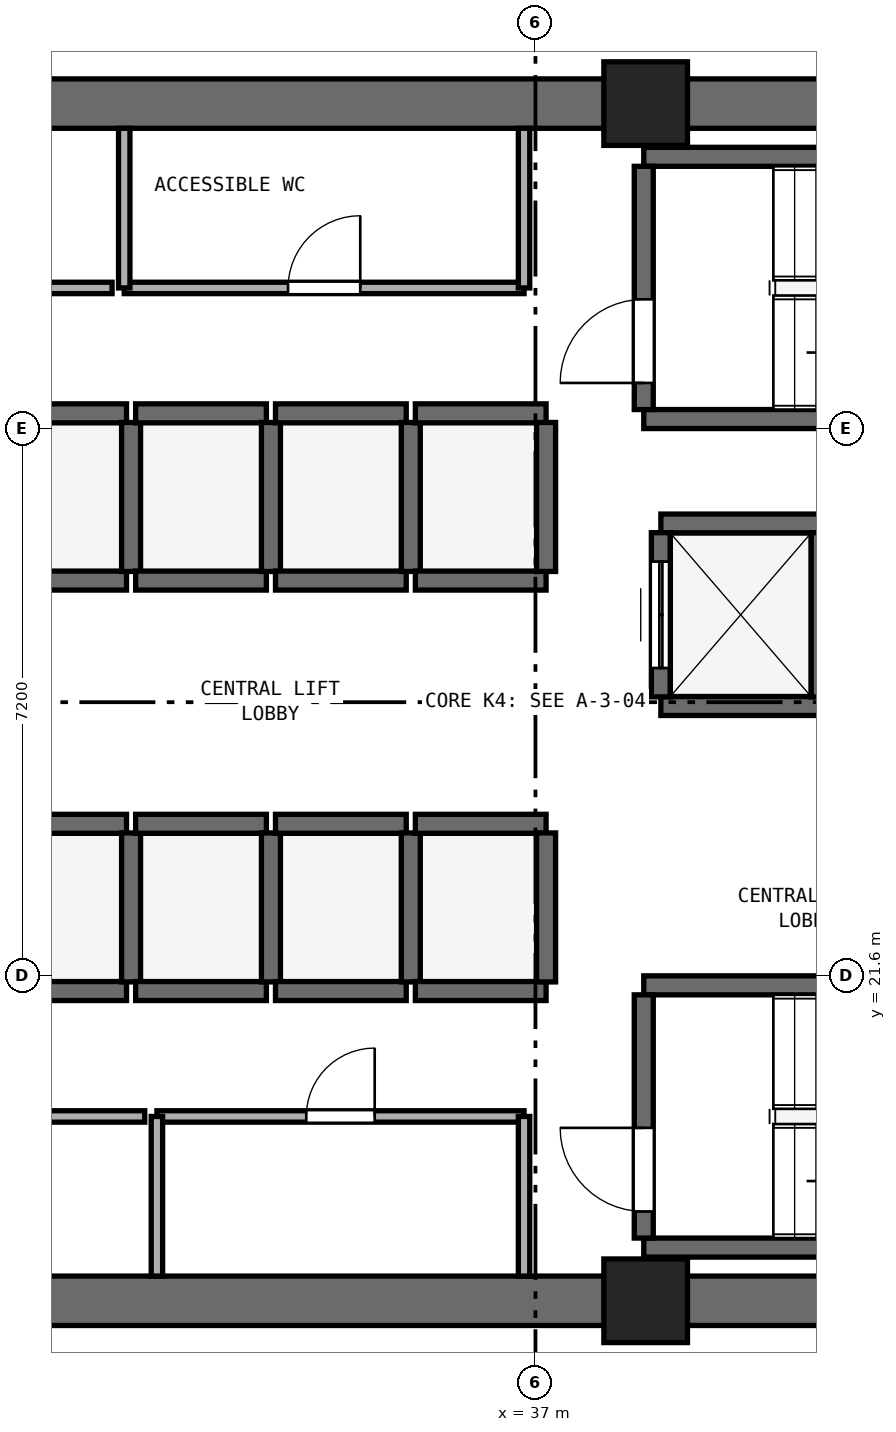
"""IFC4 building model, lengths in metres.
Left out: names, types, materials, properties, quantities, classifications, styles, units other than length and angle.
Written with IfcOpenShell. Run it as: python <this file> out.ifc"""

import sys

from ifc_helpers import new_model, si_unit, direction, frame, frame_2d, origin, origin_2d, place, context, subcontext, project, spatial, rectangle, extrude, element, fill, save


model = new_model("IFC4")
c1 = context("Model", 3, precision=1e-05, world=origin(), true_north=direction((0.0, 1.0)))
c2 = subcontext(c1, "Body", "Model", "MODEL_VIEW")
j1 = project(units=[si_unit("LENGTHUNIT", "METRE"), si_unit("PLANEANGLEUNIT", "RADIAN")], contexts=[c1])
p1 = place(None, origin())
s1 = spatial("IfcSite", under=j1, at=p1, CompositionType="ELEMENT")
p2 = place(p1, origin())
s2 = spatial("IfcBuilding", under=s1, at=p2, CompositionType="ELEMENT")
p3 = place(p2, frame((0.0, 0.0, 120.0)))
s3 = spatial("IfcBuildingStorey", under=s2, at=p3, CompositionType="ELEMENT", Elevation=120.0)
for number, where, z_axis, x_axis in (
    (1, (25.4, 17.325, 0.0), (0.0, 0.0, 1.0), (1.0, 0.0, 0.0)),
    (2, (25.4, 33.075, 0.0), (0.0, 0.0, 1.0), (1.0, 0.0, 0.0)),
):
    element("IfcWall", number, at=place(p3, frame(where, z_axis=z_axis, x_axis=x_axis)), inside=s3, PredefinedType="SHEAR", context=c2, shape_type="SweptSolid", body=[
        extrude(rectangle(XDim=23.2, YDim=0.65, at=frame_2d((11.6, 0.0))), origin(), (0.0, 0.0, 1.0), 4.6),
    ])
for number, where, z_axis, x_axis in (
    (3, (38.45, 17.325, 0.0), (0.0, 0.0, 1.0), (1.0, 0.0, 0.0)),
    (4, (38.45, 33.075, 0.0), (0.0, 0.0, 1.0), (1.0, 0.0, 0.0)),
):
    element("IfcColumn", number, at=place(p3, frame(where, z_axis=z_axis, x_axis=x_axis)), inside=s3, PredefinedType="PILASTER", context=c2, shape_type="SweptSolid", body=[
        extrude(rectangle(XDim=1.1, YDim=1.1, at=origin_2d()), origin(), (0.0, 0.0, 1.0), 5.0),
    ])
for number, where, z_axis, x_axis in (
    (5, (38.425, 28.925, 0.0), (0.0, 0.0, 1.0), (1.0, 0.0, 0.0)),
    (6, (38.425, 32.375, 0.0), (0.0, 0.0, 1.0), (1.0, 0.0, 0.0)),
):
    element("IfcWall", number, at=place(p3, frame(where, z_axis=z_axis, x_axis=x_axis)), inside=s3, PredefinedType="SHEAR", context=c2, shape_type="SweptSolid", body=[
        extrude(rectangle(XDim=7.3, YDim=0.25, at=frame_2d((3.65, 0.0))), origin(), (0.0, 0.0, 1.0), 4.6),
    ])
p4 = place(p3, frame((38.425, 29.05, 0.0), z_axis=(0.0, 0.0, 1.0), x_axis=(0.0, 1.0, 0.0)))
e7 = element("IfcWall", 7, at=p4, inside=s3, PredefinedType="SHEAR", context=c2, shape_type="SweptSolid", body=[
    extrude(rectangle(XDim=3.2, YDim=0.25, at=frame_2d((1.6, 0.0))), origin(), (0.0, 0.0, 1.0), 4.6),
])
p5 = place(p4, frame((0.35, 0.0, 0.0)))
e8 = element("IfcOpeningElement", 8, at=p5, cuts=e7, PredefinedType="OPENING", context=c2, shape_type="SweptSolid", body=[
    extrude(rectangle(XDim=1.1, YDim=2.15, at=frame_2d((0.55, 1.075))), frame((0.0, 0.135, 0.0), z_axis=(0.0, -1.0, 0.0), x_axis=(1.0, 0.0, 0.0)), (0.0, 0.0, 1.0), 0.27),
])
for number, where, z_axis, x_axis in (
    (9, (38.425, 18.025, 0.0), (0.0, 0.0, 1.0), (1.0, 0.0, 0.0)),
    (10, (38.425, 21.475, 0.0), (0.0, 0.0, 1.0), (1.0, 0.0, 0.0)),
):
    element("IfcWall", number, at=place(p3, frame(where, z_axis=z_axis, x_axis=x_axis)), inside=s3, PredefinedType="SHEAR", context=c2, shape_type="SweptSolid", body=[
        extrude(rectangle(XDim=7.3, YDim=0.25, at=frame_2d((3.65, 0.0))), origin(), (0.0, 0.0, 1.0), 4.6),
    ])
p6 = place(p3, frame((38.425, 18.15, 0.0), z_axis=(0.0, 0.0, 1.0), x_axis=(0.0, 1.0, 0.0)))
e11 = element("IfcWall", 11, at=p6, inside=s3, PredefinedType="SHEAR", context=c2, shape_type="SweptSolid", body=[
    extrude(rectangle(XDim=3.2, YDim=0.25, at=frame_2d((1.6, 0.0))), origin(), (0.0, 0.0, 1.0), 4.6),
])
p7 = place(p6, frame((0.35, 0.0, 0.0)))
e12 = element("IfcOpeningElement", 12, at=p7, cuts=e11, PredefinedType="OPENING", context=c2, shape_type="SweptSolid", body=[
    extrude(rectangle(XDim=1.1, YDim=2.15, at=frame_2d((0.55, 1.075))), frame((0.0, 0.135, 0.0), z_axis=(0.0, -1.0, 0.0), x_axis=(1.0, 0.0, 0.0)), (0.0, 0.0, 1.0), 0.27),
])
for number, where, z_axis, x_axis in (
    (13, (29.9, 21.4, 0.0), (0.0, 0.0, 1.0), (1.0, 0.0, 0.0)),
    (14, (29.9, 23.6, 0.0), (0.0, 0.0, 1.0), (1.0, 0.0, 0.0)),
):
    element("IfcWall", number, at=place(p3, frame(where, z_axis=z_axis, x_axis=x_axis)), inside=s3, PredefinedType="SHEAR", context=c2, shape_type="SweptSolid", body=[
        extrude(rectangle(XDim=1.72, YDim=0.25, at=frame_2d((0.86, 0.0))), origin(), (0.0, 0.0, 1.0), 4.6),
    ])
p8 = place(p3, frame((31.68, 21.52, 0.0), z_axis=(0.0, 0.0, 1.0), x_axis=(0.0, 1.0, 0.0)))
e15 = element("IfcWall", 15, at=p8, inside=s3, PredefinedType="SHEAR", context=c2, shape_type="SweptSolid", body=[
    extrude(rectangle(XDim=1.96, YDim=0.25, at=frame_2d((0.98, 0.0))), origin(), (0.0, 0.0, 1.0), 4.6),
])
for number, where, z_axis, x_axis in (
    (16, (31.74, 21.4, 0.0), (0.0, 0.0, 1.0), (1.0, 0.0, 0.0)),
    (17, (31.74, 23.6, 0.0), (0.0, 0.0, 1.0), (1.0, 0.0, 0.0)),
):
    element("IfcWall", number, at=place(p3, frame(where, z_axis=z_axis, x_axis=x_axis)), inside=s3, PredefinedType="SHEAR", context=c2, shape_type="SweptSolid", body=[
        extrude(rectangle(XDim=1.72, YDim=0.25, at=frame_2d((0.86, 0.0))), origin(), (0.0, 0.0, 1.0), 4.6),
    ])
p9 = place(p3, frame((33.52, 21.52, 0.0), z_axis=(0.0, 0.0, 1.0), x_axis=(0.0, 1.0, 0.0)))
e18 = element("IfcWall", 18, at=p9, inside=s3, PredefinedType="SHEAR", context=c2, shape_type="SweptSolid", body=[
    extrude(rectangle(XDim=1.96, YDim=0.25, at=frame_2d((0.98, 0.0))), origin(), (0.0, 0.0, 1.0), 4.6),
])
for number, where, z_axis, x_axis in (
    (19, (33.58, 21.4, 0.0), (0.0, 0.0, 1.0), (1.0, 0.0, 0.0)),
    (20, (33.58, 23.6, 0.0), (0.0, 0.0, 1.0), (1.0, 0.0, 0.0)),
):
    element("IfcWall", number, at=place(p3, frame(where, z_axis=z_axis, x_axis=x_axis)), inside=s3, PredefinedType="SHEAR", context=c2, shape_type="SweptSolid", body=[
        extrude(rectangle(XDim=1.72, YDim=0.25, at=frame_2d((0.86, 0.0))), origin(), (0.0, 0.0, 1.0), 4.6),
    ])
p10 = place(p3, frame((35.36, 21.52, 0.0), z_axis=(0.0, 0.0, 1.0), x_axis=(0.0, 1.0, 0.0)))
e21 = element("IfcWall", 21, at=p10, inside=s3, PredefinedType="SHEAR", context=c2, shape_type="SweptSolid", body=[
    extrude(rectangle(XDim=1.96, YDim=0.25, at=frame_2d((0.98, 0.0))), origin(), (0.0, 0.0, 1.0), 4.6),
])
for number, where, z_axis, x_axis in (
    (22, (35.42, 21.4, 0.0), (0.0, 0.0, 1.0), (1.0, 0.0, 0.0)),
    (23, (35.42, 23.6, 0.0), (0.0, 0.0, 1.0), (1.0, 0.0, 0.0)),
):
    element("IfcWall", number, at=place(p3, frame(where, z_axis=z_axis, x_axis=x_axis)), inside=s3, PredefinedType="SHEAR", context=c2, shape_type="SweptSolid", body=[
        extrude(rectangle(XDim=1.72, YDim=0.25, at=frame_2d((0.86, 0.0))), origin(), (0.0, 0.0, 1.0), 4.6),
    ])
p11 = place(p3, frame((37.14, 21.52, 0.0), z_axis=(0.0, 0.0, 1.0), x_axis=(0.0, 1.0, 0.0)))
e24 = element("IfcWall", 24, at=p11, inside=s3, PredefinedType="SHEAR", context=c2, shape_type="SweptSolid", body=[
    extrude(rectangle(XDim=1.96, YDim=0.25, at=frame_2d((0.98, 0.0))), origin(), (0.0, 0.0, 1.0), 4.6),
])
for number, where, z_axis, x_axis in (
    (25, (29.9, 26.8, 0.0), (0.0, 0.0, 1.0), (1.0, 0.0, 0.0)),
    (26, (29.9, 29.0, 0.0), (0.0, 0.0, 1.0), (1.0, 0.0, 0.0)),
):
    element("IfcWall", number, at=place(p3, frame(where, z_axis=z_axis, x_axis=x_axis)), inside=s3, PredefinedType="SHEAR", context=c2, shape_type="SweptSolid", body=[
        extrude(rectangle(XDim=1.72, YDim=0.25, at=frame_2d((0.86, 0.0))), origin(), (0.0, 0.0, 1.0), 4.6),
    ])
p12 = place(p3, frame((31.68, 26.92, 0.0), z_axis=(0.0, 0.0, 1.0), x_axis=(0.0, 1.0, 0.0)))
e27 = element("IfcWall", 27, at=p12, inside=s3, PredefinedType="SHEAR", context=c2, shape_type="SweptSolid", body=[
    extrude(rectangle(XDim=1.96, YDim=0.25, at=frame_2d((0.98, 0.0))), origin(), (0.0, 0.0, 1.0), 4.6),
])
for number, where, z_axis, x_axis in (
    (28, (31.74, 26.8, 0.0), (0.0, 0.0, 1.0), (1.0, 0.0, 0.0)),
    (29, (31.74, 29.0, 0.0), (0.0, 0.0, 1.0), (1.0, 0.0, 0.0)),
):
    element("IfcWall", number, at=place(p3, frame(where, z_axis=z_axis, x_axis=x_axis)), inside=s3, PredefinedType="SHEAR", context=c2, shape_type="SweptSolid", body=[
        extrude(rectangle(XDim=1.72, YDim=0.25, at=frame_2d((0.86, 0.0))), origin(), (0.0, 0.0, 1.0), 4.6),
    ])
p13 = place(p3, frame((33.52, 26.92, 0.0), z_axis=(0.0, 0.0, 1.0), x_axis=(0.0, 1.0, 0.0)))
e30 = element("IfcWall", 30, at=p13, inside=s3, PredefinedType="SHEAR", context=c2, shape_type="SweptSolid", body=[
    extrude(rectangle(XDim=1.96, YDim=0.25, at=frame_2d((0.98, 0.0))), origin(), (0.0, 0.0, 1.0), 4.6),
])
for number, where, z_axis, x_axis in (
    (31, (33.58, 26.8, 0.0), (0.0, 0.0, 1.0), (1.0, 0.0, 0.0)),
    (32, (33.58, 29.0, 0.0), (0.0, 0.0, 1.0), (1.0, 0.0, 0.0)),
):
    element("IfcWall", number, at=place(p3, frame(where, z_axis=z_axis, x_axis=x_axis)), inside=s3, PredefinedType="SHEAR", context=c2, shape_type="SweptSolid", body=[
        extrude(rectangle(XDim=1.72, YDim=0.25, at=frame_2d((0.86, 0.0))), origin(), (0.0, 0.0, 1.0), 4.6),
    ])
p14 = place(p3, frame((35.36, 26.92, 0.0), z_axis=(0.0, 0.0, 1.0), x_axis=(0.0, 1.0, 0.0)))
e33 = element("IfcWall", 33, at=p14, inside=s3, PredefinedType="SHEAR", context=c2, shape_type="SweptSolid", body=[
    extrude(rectangle(XDim=1.96, YDim=0.25, at=frame_2d((0.98, 0.0))), origin(), (0.0, 0.0, 1.0), 4.6),
])
for number, where, z_axis, x_axis in (
    (34, (35.42, 26.8, 0.0), (0.0, 0.0, 1.0), (1.0, 0.0, 0.0)),
    (35, (35.42, 29.0, 0.0), (0.0, 0.0, 1.0), (1.0, 0.0, 0.0)),
):
    element("IfcWall", number, at=place(p3, frame(where, z_axis=z_axis, x_axis=x_axis)), inside=s3, PredefinedType="SHEAR", context=c2, shape_type="SweptSolid", body=[
        extrude(rectangle(XDim=1.72, YDim=0.25, at=frame_2d((0.86, 0.0))), origin(), (0.0, 0.0, 1.0), 4.6),
    ])
p15 = place(p3, frame((37.14, 26.92, 0.0), z_axis=(0.0, 0.0, 1.0), x_axis=(0.0, 1.0, 0.0)))
e36 = element("IfcWall", 36, at=p15, inside=s3, PredefinedType="SHEAR", context=c2, shape_type="SweptSolid", body=[
    extrude(rectangle(XDim=1.96, YDim=0.25, at=frame_2d((0.98, 0.0))), origin(), (0.0, 0.0, 1.0), 4.6),
])
for number, where, z_axis, x_axis in (
    (37, (38.65, 25.15, 0.0), (0.0, 0.0, 1.0), (1.0, 0.0, 0.0)),
    (38, (38.65, 27.55, 0.0), (0.0, 0.0, 1.0), (1.0, 0.0, 0.0)),
):
    element("IfcWall", number, at=place(p3, frame(where, z_axis=z_axis, x_axis=x_axis)), inside=s3, PredefinedType="SHEAR", context=c2, shape_type="SweptSolid", body=[
        extrude(rectangle(XDim=2.1, YDim=0.25, at=frame_2d((1.05, 0.0))), origin(), (0.0, 0.0, 1.0), 4.6),
    ])
p16 = place(p3, frame((38.65, 25.27, 0.0), z_axis=(0.0, 0.0, 1.0), x_axis=(0.0, 1.0, 0.0)))
e39 = element("IfcWall", 39, at=p16, inside=s3, PredefinedType="SHEAR", context=c2, shape_type="SweptSolid", body=[
    extrude(rectangle(XDim=2.16, YDim=0.25, at=frame_2d((1.08, 0.0))), origin(), (0.0, 0.0, 1.0), 4.6),
])
p17 = place(p16, frame((0.38, 0.0, 0.0)))
e40 = element("IfcOpeningElement", 40, at=p17, cuts=e39, PredefinedType="OPENING", context=c2, shape_type="SweptSolid", body=[
    extrude(rectangle(XDim=1.4, YDim=2.2, at=frame_2d((0.7, 1.1))), frame((0.0, 0.135, 0.0), z_axis=(0.0, -1.0, 0.0), x_axis=(1.0, 0.0, 0.0)), (0.0, 0.0, 1.0), 0.27),
])
p18 = place(p3, frame((40.75, 25.27, 0.0), z_axis=(0.0, 0.0, 1.0), x_axis=(0.0, 1.0, 0.0)))
e41 = element("IfcWall", 41, at=p18, inside=s3, PredefinedType="SHEAR", context=c2, shape_type="SweptSolid", body=[
    extrude(rectangle(XDim=2.16, YDim=0.25, at=frame_2d((1.08, 0.0))), origin(), (0.0, 0.0, 1.0), 4.6),
])
p19 = place(p3, frame((26.17, 30.65, 0.0), z_axis=(0.0, 0.0, 1.0), x_axis=(1.0, 0.0, 0.0)))
e42 = element("IfcWall", 42, at=p19, inside=s3, PredefinedType="PARTITIONING", context=c2, shape_type="SweptSolid", body=[
    extrude(rectangle(XDim=5.26, YDim=0.15, at=frame_2d((2.63, 0.0))), origin(), (0.0, 0.0, 1.0), 4.6),
])
p20 = place(p19, frame((2.155, 0.0, 0.0)))
e43 = element("IfcOpeningElement", 43, at=p20, cuts=e42, PredefinedType="OPENING", context=c2, shape_type="SweptSolid", body=[
    extrude(rectangle(XDim=0.95, YDim=2.1, at=frame_2d((0.475, 1.05))), frame((0.0, 0.085, 0.0), z_axis=(0.0, -1.0, 0.0), x_axis=(1.0, 0.0, 0.0)), (0.0, 0.0, 1.0), 0.17),
])
p21 = place(p3, frame((31.59, 30.65, 0.0), z_axis=(0.0, 0.0, 1.0), x_axis=(1.0, 0.0, 0.0)))
e44 = element("IfcWall", 44, at=p21, inside=s3, PredefinedType="PARTITIONING", context=c2, shape_type="SweptSolid", body=[
    extrude(rectangle(XDim=5.26, YDim=0.15, at=frame_2d((2.63, 0.0))), origin(), (0.0, 0.0, 1.0), 4.6),
])
p22 = place(p21, frame((2.155, 0.0, 0.0)))
e45 = element("IfcOpeningElement", 45, at=p22, cuts=e44, PredefinedType="OPENING", context=c2, shape_type="SweptSolid", body=[
    extrude(rectangle(XDim=0.95, YDim=2.1, at=frame_2d((0.475, 1.05))), frame((0.0, 0.085, 0.0), z_axis=(0.0, -1.0, 0.0), x_axis=(1.0, 0.0, 0.0)), (0.0, 0.0, 1.0), 0.17),
])
for number, where, z_axis, x_axis in (
    (46, (31.59, 30.65, 0.0), (0.0, 0.0, 1.0), (0.0, 1.0, 0.0)),
    (47, (36.85, 30.65, 0.0), (0.0, 0.0, 1.0), (0.0, 1.0, 0.0)),
):
    element("IfcWall", number, at=place(p3, frame(where, z_axis=z_axis, x_axis=x_axis)), inside=s3, PredefinedType="PARTITIONING", context=c2, shape_type="SweptSolid", body=[
        extrude(rectangle(XDim=2.1, YDim=0.15, at=frame_2d((1.05, 0.0))), origin(), (0.0, 0.0, 1.0), 4.6),
    ])
p23 = place(p3, frame((26.17, 19.75, 0.0), z_axis=(0.0, 0.0, 1.0), x_axis=(1.0, 0.0, 0.0)))
e48 = element("IfcWall", 48, at=p23, inside=s3, PredefinedType="PARTITIONING", context=c2, shape_type="SweptSolid", body=[
    extrude(rectangle(XDim=5.69, YDim=0.15, at=frame_2d((2.845, 0.0))), origin(), (0.0, 0.0, 1.0), 4.6),
])
p24 = place(p23, frame((2.37, 0.0, 0.0)))
e49 = element("IfcOpeningElement", 49, at=p24, cuts=e48, PredefinedType="OPENING", context=c2, shape_type="SweptSolid", body=[
    extrude(rectangle(XDim=0.95, YDim=2.1, at=frame_2d((0.475, 1.05))), frame((0.0, 0.085, 0.0), z_axis=(0.0, -1.0, 0.0), x_axis=(1.0, 0.0, 0.0)), (0.0, 0.0, 1.0), 0.17),
])
p25 = place(p3, frame((32.02, 19.75, 0.0), z_axis=(0.0, 0.0, 1.0), x_axis=(1.0, 0.0, 0.0)))
e50 = element("IfcWall", 50, at=p25, inside=s3, PredefinedType="PARTITIONING", context=c2, shape_type="SweptSolid", body=[
    extrude(rectangle(XDim=4.83, YDim=0.15, at=frame_2d((2.415, 0.0))), origin(), (0.0, 0.0, 1.0), 4.6),
])
p26 = place(p25, frame((1.965, 0.0, 0.0)))
e51 = element("IfcOpeningElement", 51, at=p26, cuts=e50, PredefinedType="OPENING", context=c2, shape_type="SweptSolid", body=[
    extrude(rectangle(XDim=0.9, YDim=2.1, at=frame_2d((0.45, 1.05))), frame((0.0, 0.085, 0.0), z_axis=(0.0, -1.0, 0.0), x_axis=(1.0, 0.0, 0.0)), (0.0, 0.0, 1.0), 0.17),
])
for number, where, z_axis, x_axis in (
    (52, (32.02, 17.65, 0.0), (0.0, 0.0, 1.0), (0.0, 1.0, 0.0)),
    (53, (36.85, 17.65, 0.0), (0.0, 0.0, 1.0), (0.0, 1.0, 0.0)),
):
    element("IfcWall", number, at=place(p3, frame(where, z_axis=z_axis, x_axis=x_axis)), inside=s3, PredefinedType="PARTITIONING", context=c2, shape_type="SweptSolid", body=[
        extrude(rectangle(XDim=2.1, YDim=0.15, at=frame_2d((1.05, 0.0))), origin(), (0.0, 0.0, 1.0), 4.6),
    ])
p27 = place(p5, origin())
e54 = element("IfcDoor", 54, at=p27, inside=s3, OperationType="SINGLE_SWING_LEFT", PredefinedType="DOOR", context=c2, shape_type="SweptSolid", body=[
    extrude(rectangle(XDim=1.1, YDim=2.15, at=frame_2d((0.55, 1.075))), frame((0.0, 0.025, 0.0), z_axis=(0.0, -1.0, 0.0), x_axis=(1.0, 0.0, 0.0)), (0.0, 0.0, 1.0), 0.05),
])
fill(e8, e54)
p28 = place(p7, origin())
e55 = element("IfcDoor", 55, at=p28, inside=s3, OperationType="SINGLE_SWING_RIGHT", PredefinedType="DOOR", context=c2, shape_type="SweptSolid", body=[
    extrude(rectangle(XDim=1.1, YDim=2.15, at=frame_2d((0.55, 1.075))), frame((0.0, 0.025, 0.0), z_axis=(0.0, -1.0, 0.0), x_axis=(1.0, 0.0, 0.0)), (0.0, 0.0, 1.0), 0.05),
])
fill(e12, e55)
p29 = place(p17, origin())
e56 = element("IfcDoor", 56, at=p29, inside=s3, OperationType="DOUBLE_DOOR_SLIDING", PredefinedType="DOOR", context=c2, shape_type="SweptSolid", body=[
    extrude(rectangle(XDim=1.4, YDim=2.2, at=frame_2d((0.7, 1.1))), frame((0.0, 0.025, 0.0), z_axis=(0.0, -1.0, 0.0), x_axis=(1.0, 0.0, 0.0)), (0.0, 0.0, 1.0), 0.05),
])
fill(e40, e56)
p30 = place(p22, origin())
e57 = element("IfcDoor", 57, at=p30, inside=s3, OperationType="SINGLE_SWING_RIGHT", PredefinedType="DOOR", context=c2, shape_type="SweptSolid", body=[
    extrude(rectangle(XDim=0.95, YDim=2.1, at=frame_2d((0.475, 1.05))), frame((0.0, 0.025, 0.0), z_axis=(0.0, -1.0, 0.0), x_axis=(1.0, 0.0, 0.0)), (0.0, 0.0, 1.0), 0.05),
])
fill(e45, e57)
p31 = place(p26, origin())
e58 = element("IfcDoor", 58, at=p31, inside=s3, OperationType="SINGLE_SWING_RIGHT", PredefinedType="DOOR", context=c2, shape_type="SweptSolid", body=[
    extrude(rectangle(XDim=0.9, YDim=2.1, at=frame_2d((0.45, 1.05))), frame((0.0, 0.025, 0.0), z_axis=(0.0, -1.0, 0.0), x_axis=(1.0, 0.0, 0.0)), (0.0, 0.0, 1.0), 0.05),
])
fill(e51, e58)
save(model, sys.argv[1])
